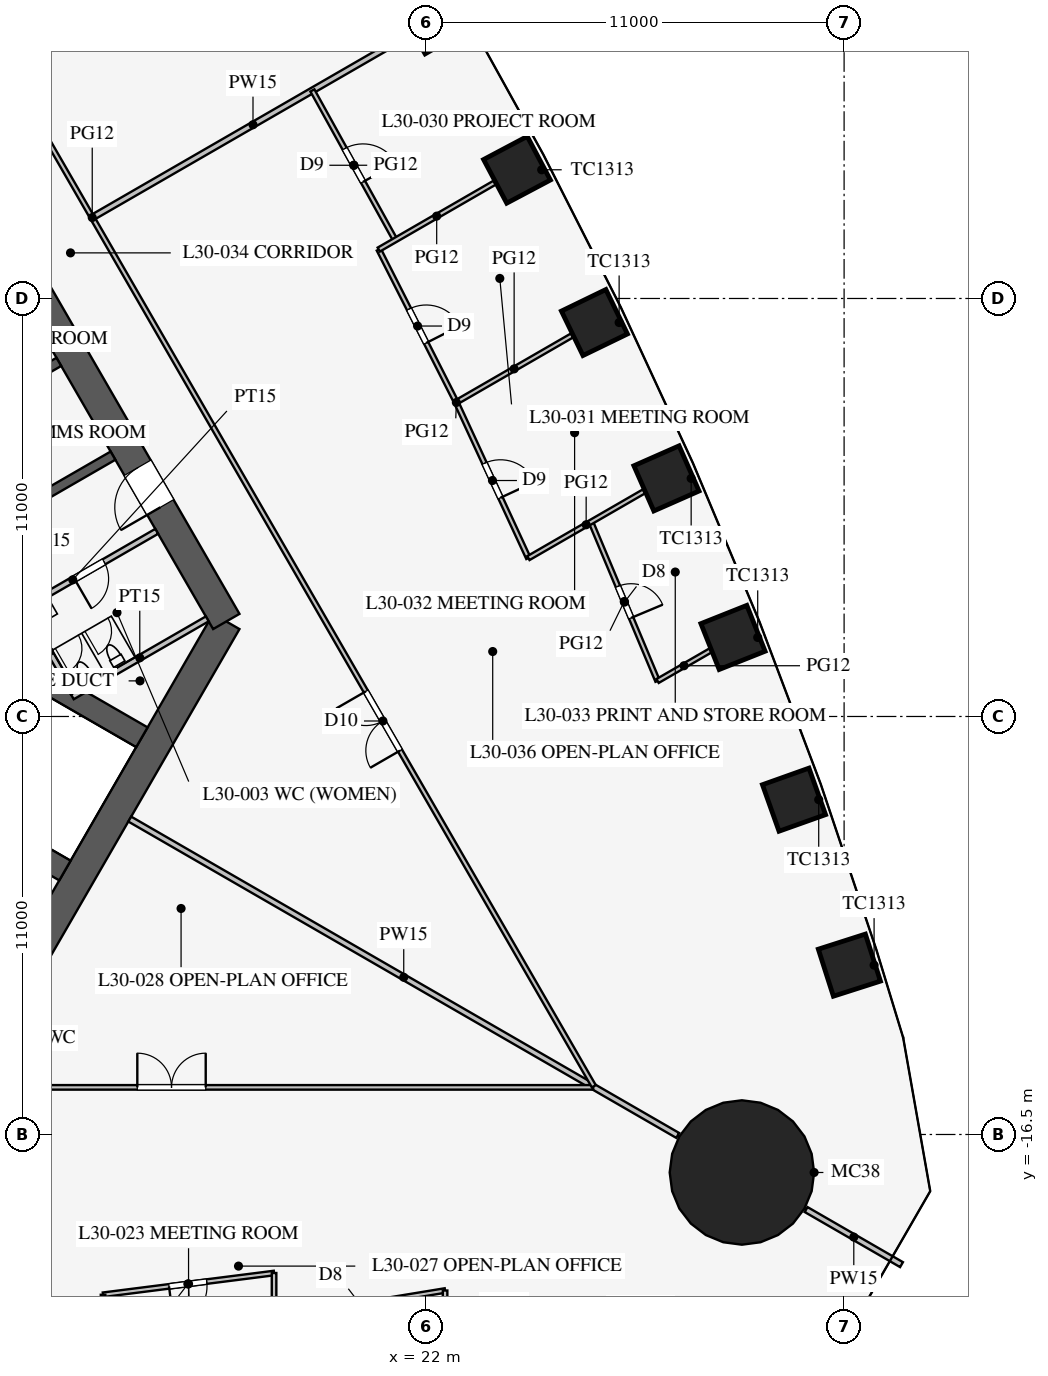
"""IFC4 building model, lengths in metres.
Left out: names, types, materials, properties, quantities, classifications, styles, units other than length and angle.
Written with IfcOpenShell. Run it as: python <this file> out.ifc"""

import sys

from ifc_helpers import new_model, si_unit, direction, frame, frame_2d, origin, origin_2d, place, context, subcontext, project, spatial, rectangle, circle, extrude, element, fill, save


model = new_model("IFC4")
c1 = context("Model", 3, precision=1e-05, world=origin(), true_north=direction((0.0, 1.0)))
c2 = subcontext(c1, "Body", "Model", "MODEL_VIEW")
j1 = project(units=[si_unit("LENGTHUNIT", "METRE"), si_unit("PLANEANGLEUNIT", "RADIAN")], contexts=[c1])
p1 = place(None, origin())
s1 = spatial("IfcSite", under=j1, at=p1, CompositionType="ELEMENT")
p2 = place(p1, origin())
s2 = spatial("IfcBuilding", under=s1, at=p2, CompositionType="ELEMENT")
p3 = place(p2, frame((0.0, 0.0, 132.5)))
s3 = spatial("IfcBuildingStorey", under=s2, at=p3, CompositionType="ELEMENT", Elevation=132.5)
for number, where, z_axis, x_axis in (
    (1, (33.139, -12.044, 0.0), (0.0, 0.0, 1.0), (-0.305, 0.952, 0.0)),
    (2, (31.682, -7.689, 0.0), (0.0, 0.0, 1.0), (-0.336, 0.942, 0.0)),
    (3, (30.077, -3.42, 0.0), (0.0, 0.0, 1.0), (-0.37, 0.929, 0.0)),
    (4, (28.325, 0.765, 0.0), (0.0, 0.0, 1.0), (-0.403, 0.915, 0.0)),
    (5, (26.43, 4.867, 0.0), (0.0, 0.0, 1.0), (-0.436, 0.9, 0.0)),
    (6, (24.393, 8.887, 0.0), (0.0, 0.0, 1.0), (-0.468, 0.883, 0.0)),
    (7, (22.213, 12.825, 0.0), (0.0, 0.0, 1.0), (-0.5, 0.866, 0.0)),
):
    element("IfcColumn", number, at=place(p3, frame(where, z_axis=z_axis, x_axis=x_axis)), inside=s3, PredefinedType="COLUMN", context=c2, shape_type="SweptSolid", body=[
        extrude(rectangle(XDim=1.3, YDim=1.3, at=origin_2d()), origin(), (0.0, 0.0, 1.0), 4.2),
    ])
p4 = place(p3, frame((30.311, -17.5, 0.0), z_axis=(0.0, 0.0, 1.0), x_axis=(1.0, 0.0, 0.0)))
e8 = element("IfcColumn", 8, at=p4, inside=s3, PredefinedType="COLUMN", context=c2, shape_type="SweptSolid", body=[
    extrude(circle(Radius=1.9, at=origin_2d()), origin(), (0.0, 0.0, 1.0), 4.2),
])
p5 = place(p3, frame((10.97, -13.0, 0.0), z_axis=(0.0, 0.0, 1.0), x_axis=(0.499995765644, 0.866027848477, 0.0)))
e9 = element("IfcWall", 9, at=p5, inside=s3, PredefinedType="SHEAR", context=c2, shape_type="SweptSolid", body=[
    extrude(rectangle(XDim=11.547, YDim=0.8, at=frame_2d((5.773, 0.0))), origin(), (0.0, 0.0, 1.0), 4.2),
])
p6 = place(p3, frame((16.743, -3.0, 0.0), z_axis=(0.0, 0.0, 1.0), x_axis=(-0.500002442456, 0.866023993627, 0.0)))
e10 = element("IfcWall", 10, at=p6, inside=s3, PredefinedType="SHEAR", context=c2, shape_type="SweptSolid", body=[
    extrude(rectangle(XDim=21.939, YDim=0.8, at=frame_2d((10.97, 0.0))), origin(), (0.0, 0.0, 1.0), 4.2),
])
p7 = place(p6, frame((17.27, 0.0, 0.0)))
e11 = element("IfcOpeningElement", 11, at=p7, cuts=e10, PredefinedType="OPENING", context=c2, shape_type="SweptSolid", body=[
    extrude(rectangle(XDim=1.2, YDim=2.1, at=frame_2d((0.6, 1.05))), frame((0.0, 0.41, 0.0), z_axis=(0.0, -1.0, 0.0), x_axis=(1.0, 0.0, 0.0)), (0.0, 0.0, 1.0), 0.82),
])
p8 = place(p6, frame((3.47, 0.0, 0.0)))
e12 = element("IfcOpeningElement", 12, at=p8, cuts=e10, PredefinedType="OPENING", context=c2, shape_type="SweptSolid", body=[
    extrude(rectangle(XDim=1.2, YDim=2.1, at=frame_2d((0.6, 1.05))), frame((0.0, 0.41, 0.0), z_axis=(0.0, -1.0, 0.0), x_axis=(1.0, 0.0, 0.0)), (0.0, 0.0, 1.0), 0.82),
])
for number, where, z_axis, x_axis in (
    (13, (11.532, 0.076, 0.0), (0.0, 0.0, 1.0), (0.866, 0.5, 0.0)),
    (14, (10.107, 2.544, 0.0), (0.0, 0.0, 1.0), (0.866, 0.5, 0.0)),
):
    element("IfcWall", number, at=place(p3, frame(where, z_axis=z_axis, x_axis=x_axis)), inside=s3, PredefinedType="SHEAR", context=c2, shape_type="SweptSolid", body=[
        extrude(rectangle(XDim=2.575, YDim=0.25, at=frame_2d((1.288, 0.0))), origin(), (0.0, 0.0, 1.0), 4.2),
    ])
for number, where, z_axis, x_axis in (
    (15, (4.638, -5.016, 0.0), (0.0, 0.0, 1.0), (0.866, -0.5, 0.0)),
    (16, (6.663, -1.509, 0.0), (0.0, 0.0, 1.0), (0.866, -0.5, 0.0)),
):
    element("IfcWall", number, at=place(p3, frame(where, z_axis=z_axis, x_axis=x_axis)), inside=s3, PredefinedType="SHEAR", context=c2, shape_type="SweptSolid", body=[
        extrude(rectangle(XDim=9.075, YDim=0.6, at=frame_2d((4.538, 0.0))), origin(), (0.0, 0.0, 1.0), 4.2),
    ])
p9 = place(p3, frame((10.495, -3.178, 0.0), z_axis=(0.0, 0.0, 1.0), x_axis=(0.86602216432, 0.500005610874, 0.0)))
e17 = element("IfcWall", 17, at=p9, inside=s3, PredefinedType="PARTITIONING", context=c2, shape_type="SweptSolid", body=[
    extrude(rectangle(XDim=5.1, YDim=0.15, at=frame_2d((2.55, 0.0))), origin(), (0.0, 0.0, 1.0), 4.0),
])
p10 = place(p9, frame((2.6, 0.0, 0.0)))
e18 = element("IfcOpeningElement", 18, at=p10, cuts=e17, PredefinedType="OPENING", context=c2, shape_type="SweptSolid", body=[
    extrude(rectangle(XDim=0.9, YDim=2.1, at=frame_2d((0.45, 1.05))), frame((0.0, 0.085, 0.0), z_axis=(0.0, -1.0, 0.0), x_axis=(1.0, 0.0, 0.0)), (0.0, 0.0, 1.0), 0.17),
])
p11 = place(p3, frame((12.691, -4.982, 0.0), z_axis=(0.0, 0.0, 1.0), x_axis=(0.8660249478, 0.500000789788, 0.0)))
e19 = element("IfcWall", 19, at=p11, inside=s3, PredefinedType="PARTITIONING", context=c2, shape_type="SweptSolid", body=[
    extrude(rectangle(XDim=4.1, YDim=0.15, at=frame_2d((2.05, 0.0))), origin(), (0.0, 0.0, 1.0), 4.0),
])
p12 = place(p3, frame((11.464, -2.706, 0.0), z_axis=(0.0, 0.0, 1.0), x_axis=(0.50001992892, -0.866013897511, 0.0)))
e20 = element("IfcWall", 20, at=p12, inside=s3, PredefinedType="PARTITIONING", context=c2, shape_type="SweptSolid", body=[
    extrude(rectangle(XDim=2.51, YDim=0.15, at=frame_2d((1.255, 0.0))), origin(), (0.0, 0.0, 1.0), 4.0),
])
p13 = place(p3, frame((14.203, -8.2, 0.0), z_axis=(0.0, 0.0, 1.0), x_axis=(0.866024668836, -0.500001272966, 0.0)))
e21 = element("IfcWall", 21, at=p13, inside=s3, PredefinedType="PARTITIONING", context=c2, shape_type="SweptSolid", body=[
    extrude(rectangle(XDim=16.65, YDim=0.15, at=frame_2d((8.325, 0.0))), origin(), (0.0, 0.0, 1.0), 2.3),
])
p14 = place(p3, frame((32.0, -18.475, 0.0), z_axis=(0.0, 0.0, 1.0), x_axis=(0.866042548026, -0.499970304126, 0.0)))
e22 = element("IfcWall", 22, at=p14, inside=s3, PredefinedType="PARTITIONING", context=c2, shape_type="SweptSolid", body=[
    extrude(rectangle(XDim=2.899, YDim=0.15, at=frame_2d((1.45, 0.0))), origin(), (0.0, 0.0, 1.0), 2.3),
])
p15 = place(p3, frame((-26.398, -15.26, 0.0), z_axis=(0.0, 0.0, 1.0), x_axis=(1.0, 0.0, 0.0)))
e23 = element("IfcWall", 23, at=p15, inside=s3, PredefinedType="PARTITIONING", context=c2, shape_type="SweptSolid", body=[
    extrude(rectangle(XDim=52.796, YDim=0.12, at=frame_2d((26.398, 0.0))), origin(), (0.0, 0.0, 1.0), 2.9),
])
p16 = place(p15, frame((10.2, 0.0, 0.15)))
e24 = element("IfcOpeningElement", 24, at=p16, cuts=e23, PredefinedType="OPENING", context=c2, shape_type="SweptSolid", body=[
    extrude(rectangle(XDim=1.8, YDim=2.1, at=frame_2d((0.9, 1.05))), frame((0.0, 0.07, 0.0), z_axis=(0.0, -1.0, 0.0), x_axis=(1.0, 0.0, 0.0)), (0.0, 0.0, 1.0), 0.14),
])
p17 = place(p15, frame((40.8, 0.0, 0.15)))
e25 = element("IfcOpeningElement", 25, at=p17, cuts=e23, PredefinedType="OPENING", context=c2, shape_type="SweptSolid", body=[
    extrude(rectangle(XDim=1.8, YDim=2.1, at=frame_2d((0.9, 1.05))), frame((0.0, 0.07, 0.0), z_axis=(0.0, -1.0, 0.0), x_axis=(1.0, 0.0, 0.0)), (0.0, 0.0, 1.0), 0.14),
])
p18 = place(p3, frame((13.5, -20.718, 0.0), z_axis=(0.0, 0.0, 1.0), x_axis=(0.992010652594, 0.12615413247, 0.0)))
e26 = element("IfcWall", 26, at=p18, inside=s3, PredefinedType="PARTITIONING", context=c2, shape_type="SweptSolid", body=[
    extrude(rectangle(XDim=4.536, YDim=0.12, at=frame_2d((2.268, 0.0))), origin(), (0.0, 0.0, 1.0), 2.9),
])
p19 = place(p18, frame((1.75, 0.0, 0.15)))
e27 = element("IfcOpeningElement", 27, at=p19, cuts=e26, PredefinedType="OPENING", context=c2, shape_type="SweptSolid", body=[
    extrude(rectangle(XDim=1.0, YDim=2.1, at=frame_2d((0.5, 1.05))), frame((0.0, 0.07, 0.0), z_axis=(0.0, -1.0, 0.0), x_axis=(1.0, 0.0, 0.0)), (0.0, 0.0, 1.0), 0.14),
])
p20 = place(p3, frame((18.0, -21.345, 0.0), z_axis=(0.0, 0.0, 1.0), x_axis=(0.986764681833, 0.162158757664, 0.0)))
e28 = element("IfcWall", 28, at=p20, inside=s3, PredefinedType="PARTITIONING", context=c2, shape_type="SweptSolid", body=[
    extrude(rectangle(XDim=4.56, YDim=0.12, at=frame_2d((2.28, 0.0))), origin(), (0.0, 0.0, 1.0), 2.9),
])
p21 = place(p20, frame((1.85, 0.0, 0.15)))
e29 = element("IfcOpeningElement", 29, at=p21, cuts=e28, PredefinedType="OPENING", context=c2, shape_type="SweptSolid", body=[
    extrude(rectangle(XDim=0.9, YDim=2.1, at=frame_2d((0.45, 1.05))), frame((0.0, 0.07, 0.0), z_axis=(0.0, -1.0, 0.0), x_axis=(1.0, 0.0, 0.0)), (0.0, 0.0, 1.0), 0.14),
])
p22 = place(p3, frame((13.5, -20.718, 0.0), z_axis=(0.0, 0.0, 1.0), x_axis=(0.0, -1.0, 0.0)))
e30 = element("IfcWall", 30, at=p22, inside=s3, PredefinedType="PARTITIONING", context=c2, shape_type="SweptSolid", body=[
    extrude(rectangle(XDim=3.511, YDim=0.12, at=frame_2d((1.756, 0.0))), origin(), (0.0, 0.0, 1.0), 2.9),
])
p23 = place(p3, frame((18.0, -20.146, 0.0), z_axis=(0.0, 0.0, 1.0), x_axis=(0.0, -1.0, 0.0)))
e31 = element("IfcWall", 31, at=p23, inside=s3, PredefinedType="PARTITIONING", context=c2, shape_type="SweptSolid", body=[
    extrude(rectangle(XDim=3.505, YDim=0.12, at=frame_2d((1.752, 0.0))), origin(), (0.0, 0.0, 1.0), 2.9),
])
p24 = place(p3, frame((22.5, -20.606, 0.0), z_axis=(0.0, 0.0, 1.0), x_axis=(0.0, -1.0, 0.0)))
e32 = element("IfcWall", 32, at=p24, inside=s3, PredefinedType="PARTITIONING", context=c2, shape_type="SweptSolid", body=[
    extrude(rectangle(XDim=2.295, YDim=0.12, at=frame_2d((1.148, 0.0))), origin(), (0.0, 0.0, 1.0), 2.9),
])
p25 = place(p3, frame((13.268, 7.66, 0.0), z_axis=(0.0, 0.0, 1.0), x_axis=(0.866015788683, 0.500016653474, 0.0)))
e33 = element("IfcWall", 33, at=p25, inside=s3, PredefinedType="PARTITIONING", context=c2, shape_type="SweptSolid", body=[
    extrude(rectangle(XDim=9.65, YDim=0.15, at=frame_2d((4.825, 0.0))), origin(), (0.0, 0.0, 1.0), 3.2),
])
p26 = place(p3, frame((26.415, -15.231, 0.0), z_axis=(0.0, 0.0, 1.0), x_axis=(-0.50000091641, 0.866024874695, 0.0)))
e34 = element("IfcWall", 34, at=p26, inside=s3, PredefinedType="PARTITIONING", context=c2, shape_type="SweptSolid", body=[
    extrude(rectangle(XDim=52.796, YDim=0.12, at=frame_2d((26.398, 0.0))), origin(), (0.0, 0.0, 1.0), 2.9),
])
p27 = place(p26, frame((10.2, 0.0, 0.15)))
e35 = element("IfcOpeningElement", 35, at=p27, cuts=e34, PredefinedType="OPENING", context=c2, shape_type="SweptSolid", body=[
    extrude(rectangle(XDim=1.8, YDim=2.1, at=frame_2d((0.9, 1.05))), frame((0.0, 0.07, 0.0), z_axis=(0.0, -1.0, 0.0), x_axis=(1.0, 0.0, 0.0)), (0.0, 0.0, 1.0), 0.14),
])
p28 = place(p26, frame((40.8, 0.0, 0.15)))
e36 = element("IfcOpeningElement", 36, at=p28, cuts=e34, PredefinedType="OPENING", context=c2, shape_type="SweptSolid", body=[
    extrude(rectangle(XDim=1.8, YDim=2.1, at=frame_2d((0.9, 1.05))), frame((0.0, 0.07, 0.0), z_axis=(0.0, -1.0, 0.0), x_axis=(1.0, 0.0, 0.0)), (0.0, 0.0, 1.0), 0.14),
])
p29 = place(p3, frame((24.692, -1.333, 0.0), z_axis=(0.0, 0.0, 1.0), x_axis=(-0.41992827805, 0.90755729367, 0.0)))
e37 = element("IfcWall", 37, at=p29, inside=s3, PredefinedType="PARTITIONING", context=c2, shape_type="SweptSolid", body=[
    extrude(rectangle(XDim=4.519, YDim=0.12, at=frame_2d((2.259, 0.0))), origin(), (0.0, 0.0, 1.0), 2.9),
])
p30 = place(p29, frame((1.75, 0.0, 0.15)))
e38 = element("IfcOpeningElement", 38, at=p30, cuts=e37, PredefinedType="OPENING", context=c2, shape_type="SweptSolid", body=[
    extrude(rectangle(XDim=1.0, YDim=2.1, at=frame_2d((0.5, 1.05))), frame((0.0, 0.07, 0.0), z_axis=(0.0, -1.0, 0.0), x_axis=(1.0, 0.0, 0.0)), (0.0, 0.0, 1.0), 0.14),
])
p31 = place(p3, frame((28.092, -4.566, 0.0), z_axis=(0.0, 0.0, 1.0), x_axis=(-0.386742917128, 0.92218757097, 0.0)))
e39 = element("IfcWall", 39, at=p31, inside=s3, PredefinedType="PARTITIONING", context=c2, shape_type="SweptSolid", body=[
    extrude(rectangle(XDim=4.536, YDim=0.12, at=frame_2d((2.268, 0.0))), origin(), (0.0, 0.0, 1.0), 2.9),
])
p32 = place(p31, frame((1.8, 0.0, 0.15)))
e40 = element("IfcOpeningElement", 40, at=p32, cuts=e39, PredefinedType="OPENING", context=c2, shape_type="SweptSolid", body=[
    extrude(rectangle(XDim=0.9, YDim=2.1, at=frame_2d((0.45, 1.05))), frame((0.0, 0.07, 0.0), z_axis=(0.0, -1.0, 0.0), x_axis=(1.0, 0.0, 0.0)), (0.0, 0.0, 1.0), 0.14),
])
p33 = place(p3, frame((21.189, 7.037, 0.0), z_axis=(0.0, 0.0, 1.0), x_axis=(-0.484292898211, 0.874905931368, 0.0)))
e41 = element("IfcWall", 41, at=p33, inside=s3, PredefinedType="PARTITIONING", context=c2, shape_type="SweptSolid", body=[
    extrude(rectangle(XDim=4.501, YDim=0.12, at=frame_2d((2.25, 0.0))), origin(), (0.0, 0.0, 1.0), 2.9),
])
p34 = place(p33, frame((1.75, 0.0, 0.15)))
e42 = element("IfcOpeningElement", 42, at=p34, cuts=e41, PredefinedType="OPENING", context=c2, shape_type="SweptSolid", body=[
    extrude(rectangle(XDim=1.0, YDim=2.1, at=frame_2d((0.5, 1.05))), frame((0.0, 0.07, 0.0), z_axis=(0.0, -1.0, 0.0), x_axis=(1.0, 0.0, 0.0)), (0.0, 0.0, 1.0), 0.14),
])
p35 = place(p3, frame((22.795, 2.768, 0.0), z_axis=(0.0, 0.0, 1.0), x_axis=(-0.452471679136, 0.891778772779, 0.0)))
e43 = element("IfcWall", 43, at=p35, inside=s3, PredefinedType="PARTITIONING", context=c2, shape_type="SweptSolid", body=[
    extrude(rectangle(XDim=4.507, YDim=0.12, at=frame_2d((2.253, 0.0))), origin(), (0.0, 0.0, 1.0), 2.9),
])
p36 = place(p35, frame((1.75, 0.0, 0.15)))
e44 = element("IfcOpeningElement", 44, at=p36, cuts=e43, PredefinedType="OPENING", context=c2, shape_type="SweptSolid", body=[
    extrude(rectangle(XDim=1.0, YDim=2.1, at=frame_2d((0.5, 1.05))), frame((0.0, 0.07, 0.0), z_axis=(0.0, -1.0, 0.0), x_axis=(1.0, 0.0, 0.0)), (0.0, 0.0, 1.0), 0.14),
])
p37 = place(p3, frame((24.692, -1.333, 0.0), z_axis=(0.0, 0.0, 1.0), x_axis=(0.86600959659, 0.500027377864, 0.0)))
e45 = element("IfcWall", 45, at=p37, inside=s3, PredefinedType="PARTITIONING", context=c2, shape_type="SweptSolid", body=[
    extrude(rectangle(XDim=3.511, YDim=0.12, at=frame_2d((1.756, 0.0))), origin(), (0.0, 0.0, 1.0), 2.9),
])
p38 = place(p3, frame((28.092, -4.566, 0.0), z_axis=(0.0, 0.0, 1.0), x_axis=(0.866005660673, 0.500034194513, 0.0)))
e46 = element("IfcWall", 46, at=p38, inside=s3, PredefinedType="PARTITIONING", context=c2, shape_type="SweptSolid", body=[
    extrude(rectangle(XDim=1.604, YDim=0.12, at=frame_2d((0.802, 0.0))), origin(), (0.0, 0.0, 1.0), 2.9),
])
p39 = place(p3, frame((20.756, 6.787, 0.0), z_axis=(0.0, 0.0, 1.0), x_axis=(0.866027308682, 0.499996700606, 0.0)))
e47 = element("IfcWall", 47, at=p39, inside=s3, PredefinedType="PARTITIONING", context=c2, shape_type="SweptSolid", body=[
    extrude(rectangle(XDim=3.519, YDim=0.12, at=frame_2d((1.76, 0.0))), origin(), (0.0, 0.0, 1.0), 2.9),
])
p40 = place(p3, frame((22.795, 2.768, 0.0), z_axis=(0.0, 0.0, 1.0), x_axis=(0.866034119795, 0.499984903122, 0.0)))
e48 = element("IfcWall", 48, at=p40, inside=s3, PredefinedType="PARTITIONING", context=c2, shape_type="SweptSolid", body=[
    extrude(rectangle(XDim=3.516, YDim=0.12, at=frame_2d((1.758, 0.0))), origin(), (0.0, 0.0, 1.0), 2.9),
])
p41 = place(p10, frame((0.9, 0.0, 0.0), z_axis=(0.0, 0.0, 1.0), x_axis=(-1.0, 0.0, 0.0)))
e49 = element("IfcDoor", 49, at=p41, inside=s3, OperationType="SINGLE_SWING_RIGHT", PredefinedType="DOOR", context=c2, shape_type="SweptSolid", body=[
    extrude(rectangle(XDim=0.9, YDim=2.1, at=frame_2d((0.45, 1.05))), frame((0.0, 0.025, 0.0), z_axis=(0.0, -1.0, 0.0), x_axis=(1.0, 0.0, 0.0)), (0.0, 0.0, 1.0), 0.05),
])
fill(e18, e49)
p42 = place(p8, origin())
e50 = element("IfcDoor", 50, at=p42, inside=s3, OperationType="SINGLE_SWING_LEFT", PredefinedType="DOOR", context=c2, shape_type="SweptSolid", body=[
    extrude(rectangle(XDim=1.2, YDim=2.1, at=frame_2d((0.6, 1.05))), frame((0.0, 0.025, 0.0), z_axis=(0.0, -1.0, 0.0), x_axis=(1.0, 0.0, 0.0)), (0.0, 0.0, 1.0), 0.05),
])
fill(e12, e50)
p43 = place(p19, frame((1.0, 0.0, 0.0), z_axis=(0.0, 0.0, 1.0), x_axis=(-1.0, 0.0, 0.0)))
e51 = element("IfcDoor", 51, at=p43, inside=s3, OperationType="SINGLE_SWING_RIGHT", PredefinedType="DOOR", context=c2, shape_type="SweptSolid", body=[
    extrude(rectangle(XDim=1.0, YDim=2.1, at=frame_2d((0.5, 1.05))), frame((0.0, 0.025, 0.0), z_axis=(0.0, -1.0, 0.0), x_axis=(1.0, 0.0, 0.0)), (0.0, 0.0, 1.0), 0.05),
])
fill(e27, e51)
p44 = place(p17, origin())
e52 = element("IfcDoor", 52, at=p44, inside=s3, OperationType="DOUBLE_DOOR_SINGLE_SWING", PredefinedType="DOOR", context=c2, shape_type="SweptSolid", body=[
    extrude(rectangle(XDim=1.8, YDim=2.1, at=frame_2d((0.9, 1.05))), frame((0.0, 0.025, 0.0), z_axis=(0.0, -1.0, 0.0), x_axis=(1.0, 0.0, 0.0)), (0.0, 0.0, 1.0), 0.05),
])
fill(e25, e52)
p45 = place(p34, frame((1.0, 0.0, 0.0), z_axis=(0.0, 0.0, 1.0), x_axis=(-1.0, 0.0, 0.0)))
e53 = element("IfcDoor", 53, at=p45, inside=s3, OperationType="SINGLE_SWING_RIGHT", PredefinedType="DOOR", context=c2, shape_type="SweptSolid", body=[
    extrude(rectangle(XDim=1.0, YDim=2.1, at=frame_2d((0.5, 1.05))), frame((0.0, 0.025, 0.0), z_axis=(0.0, -1.0, 0.0), x_axis=(1.0, 0.0, 0.0)), (0.0, 0.0, 1.0), 0.05),
])
fill(e42, e53)
p46 = place(p36, frame((1.0, 0.0, 0.0), z_axis=(0.0, 0.0, 1.0), x_axis=(-1.0, 0.0, 0.0)))
e54 = element("IfcDoor", 54, at=p46, inside=s3, OperationType="SINGLE_SWING_RIGHT", PredefinedType="DOOR", context=c2, shape_type="SweptSolid", body=[
    extrude(rectangle(XDim=1.0, YDim=2.1, at=frame_2d((0.5, 1.05))), frame((0.0, 0.025, 0.0), z_axis=(0.0, -1.0, 0.0), x_axis=(1.0, 0.0, 0.0)), (0.0, 0.0, 1.0), 0.05),
])
fill(e44, e54)
p47 = place(p30, frame((1.0, 0.0, 0.0), z_axis=(0.0, 0.0, 1.0), x_axis=(-1.0, 0.0, 0.0)))
e55 = element("IfcDoor", 55, at=p47, inside=s3, OperationType="SINGLE_SWING_RIGHT", PredefinedType="DOOR", context=c2, shape_type="SweptSolid", body=[
    extrude(rectangle(XDim=1.0, YDim=2.1, at=frame_2d((0.5, 1.05))), frame((0.0, 0.025, 0.0), z_axis=(0.0, -1.0, 0.0), x_axis=(1.0, 0.0, 0.0)), (0.0, 0.0, 1.0), 0.05),
])
fill(e38, e55)
p48 = place(p32, frame((0.9, 0.0, 0.0), z_axis=(0.0, 0.0, 1.0), x_axis=(-1.0, 0.0, 0.0)))
e56 = element("IfcDoor", 56, at=p48, inside=s3, OperationType="SINGLE_SWING_RIGHT", PredefinedType="DOOR", context=c2, shape_type="SweptSolid", body=[
    extrude(rectangle(XDim=0.9, YDim=2.1, at=frame_2d((0.45, 1.05))), frame((0.0, 0.025, 0.0), z_axis=(0.0, -1.0, 0.0), x_axis=(1.0, 0.0, 0.0)), (0.0, 0.0, 1.0), 0.05),
])
fill(e40, e56)
p49 = place(p27, origin())
e57 = element("IfcDoor", 57, at=p49, inside=s3, OperationType="DOUBLE_DOOR_SINGLE_SWING", PredefinedType="DOOR", context=c2, shape_type="SweptSolid", body=[
    extrude(rectangle(XDim=1.8, YDim=2.1, at=frame_2d((0.9, 1.05))), frame((0.0, 0.025, 0.0), z_axis=(0.0, -1.0, 0.0), x_axis=(1.0, 0.0, 0.0)), (0.0, 0.0, 1.0), 0.05),
])
fill(e35, e57)
save(model, sys.argv[1])
